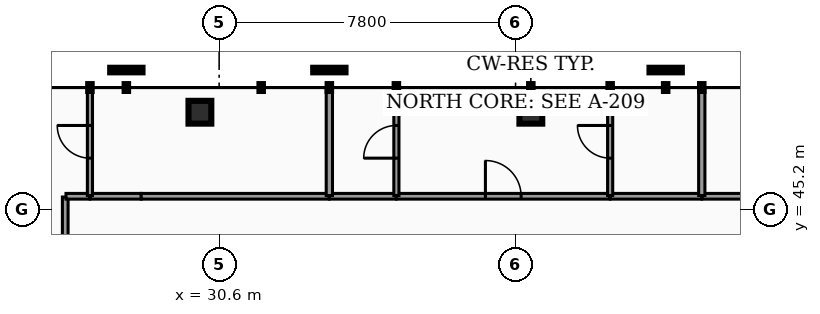
"""IFC4 building model, lengths in metres.
Left out: names, types, materials, properties, quantities, classifications, styles, units other than length and angle.
Written with IfcOpenShell. Run it as: python <this file> out.ifc"""

import sys

from ifc_helpers import new_model, si_unit, direction, frame, frame_2d, origin, origin_2d, place, context, subcontext, project, spatial, rectangle, hollow_rectangle, extrude, element, fill, save


model = new_model("IFC4")
c1 = context("Model", 3, precision=1e-05, world=origin(), true_north=direction((0.0, 1.0)))
c2 = subcontext(c1, "Body", "Model", "MODEL_VIEW")
j1 = project(units=[si_unit("LENGTHUNIT", "METRE"), si_unit("PLANEANGLEUNIT", "RADIAN")], contexts=[c1])
p1 = place(None, origin())
s1 = spatial("IfcSite", under=j1, at=p1, CompositionType="ELEMENT")
p2 = place(p1, origin())
s2 = spatial("IfcBuilding", under=s1, at=p2, CompositionType="ELEMENT")
p3 = place(p2, frame((0.0, 0.0, 212.16)))
s3 = spatial("IfcBuildingStorey", under=s2, at=p3, CompositionType="ELEMENT", Elevation=212.16)
for number, where, z_axis, x_axis in (
    (1, (38.802, 47.761, 0.0), (0.0, 0.0, 1.0), (1.0, 0.0, 0.0)),
    (2, (30.094, 47.761, 0.0), (0.0, 0.0, 1.0), (1.0, 0.0, 0.0)),
):
    element("IfcColumn", number, at=place(p3, frame(where, z_axis=z_axis, x_axis=x_axis)), inside=s3, PredefinedType="COLUMN", context=c2, shape_type="SweptSolid", body=[
        extrude(hollow_rectangle(XDim=0.6, YDim=0.6, WallThickness=0.03, at=origin_2d()), origin(), (0.0, 0.0, 1.0), 3.18),
    ])
p4 = place(p3, frame((26.55, 43.55, 0.0), z_axis=(0.0, 0.0, 1.0), x_axis=(0.0, 1.0, 0.0)))
e3 = element("IfcWall", 3, at=p4, inside=s3, PredefinedType="PARTITIONING", context=c2, shape_type="SweptSolid", body=[
    extrude(rectangle(XDim=1.98, YDim=0.15, at=frame_2d((0.99, 0.0))), origin(), (0.0, 0.0, 1.0), 2.235),
])
p5 = place(p3, frame((26.57, 45.55, 0.0), z_axis=(0.0, 0.0, 1.0), x_axis=(1.0, 0.0, 0.0)))
e4 = element("IfcWall", 4, at=p5, inside=s3, PredefinedType="PARTITIONING", context=c2, shape_type="SweptSolid", body=[
    extrude(rectangle(XDim=0.625, YDim=0.15, at=frame_2d((0.312, 0.0))), origin(), (0.0, 0.0, 1.0), 2.235),
])
p6 = place(p3, frame((27.205, 45.55, 0.0), z_axis=(0.0, 0.0, 1.0), x_axis=(1.0, 0.0, 0.0)))
e5 = element("IfcWall", 5, at=p6, inside=s3, PredefinedType="PARTITIONING", context=c2, shape_type="SweptSolid", body=[
    extrude(rectangle(XDim=1.345, YDim=0.15, at=frame_2d((0.672, 0.0))), origin(), (0.0, 0.0, 1.0), 2.235),
])
p7 = place(p3, frame((28.55, 45.55, 0.0), z_axis=(0.0, 0.0, 1.0), x_axis=(1.0, 0.0, 0.0)))
e6 = element("IfcWall", 6, at=p7, inside=s3, PredefinedType="PARTITIONING", context=c2, shape_type="SweptSolid", body=[
    extrude(rectangle(XDim=4.945, YDim=0.15, at=frame_2d((2.473, 0.0))), origin(), (0.0, 0.0, 1.0), 2.235),
])
p8 = place(p3, frame((43.305, 45.55, 0.0), z_axis=(0.0, 0.0, 1.0), x_axis=(1.0, 0.0, 0.0)))
e7 = element("IfcWall", 7, at=p8, inside=s3, PredefinedType="PARTITIONING", context=c2, shape_type="SweptSolid", body=[
    extrude(rectangle(XDim=1.97, YDim=0.15, at=frame_2d((0.985, 0.0))), origin(), (0.0, 0.0, 1.0), 2.235),
])
p9 = place(p3, frame((35.269, 45.55, 0.0), z_axis=(0.0, 0.0, 1.0), x_axis=(1.0, 0.0, 0.0)))
e8 = element("IfcWall", 8, at=p9, inside=s3, PredefinedType="PARTITIONING", context=c2, shape_type="SweptSolid", body=[
    extrude(rectangle(XDim=5.615, YDim=0.15, at=frame_2d((2.808, 0.0))), origin(), (0.0, 0.0, 1.0), 2.235),
])
p10 = place(p9, frame((2.338, 0.0, 0.0)))
e9 = element("IfcOpeningElement", 9, at=p10, cuts=e8, PredefinedType="OPENING", context=c2, shape_type="SweptSolid", body=[
    extrude(rectangle(XDim=0.94, YDim=2.05, at=frame_2d((0.47, 1.025))), frame((0.0, 0.085, 0.0), z_axis=(0.0, -1.0, 0.0), x_axis=(1.0, 0.0, 0.0)), (0.0, 0.0, 1.0), 0.17),
])
p11 = place(p3, frame((40.894, 45.55, 0.0), z_axis=(0.0, 0.0, 1.0), x_axis=(1.0, 0.0, 0.0)))
e10 = element("IfcWall", 10, at=p11, inside=s3, PredefinedType="PARTITIONING", context=c2, shape_type="SweptSolid", body=[
    extrude(rectangle(XDim=2.401, YDim=0.15, at=frame_2d((1.2, 0.0))), origin(), (0.0, 0.0, 1.0), 2.235),
])
p12 = place(p3, frame((33.505, 45.55, 0.0), z_axis=(0.0, 0.0, 1.0), x_axis=(1.0, 0.0, 0.0)))
e11 = element("IfcWall", 11, at=p12, inside=s3, PredefinedType="PARTITIONING", context=c2, shape_type="SweptSolid", body=[
    extrude(rectangle(XDim=1.754, YDim=0.15, at=frame_2d((0.877, 0.0))), origin(), (0.0, 0.0, 1.0), 2.235),
])
p13 = place(p3, frame((27.2, 45.57, 0.0), z_axis=(0.0, 0.0, 1.0), x_axis=(0.0, 1.0, 0.0)))
e12 = element("IfcWall", 12, at=p13, inside=s3, PredefinedType="PARTITIONING", context=c2, shape_type="SweptSolid", body=[
    extrude(rectangle(XDim=2.826, YDim=0.135, at=frame_2d((1.413, 0.0))), origin(), (0.0, 0.0, 1.0), 2.235),
])
p14 = place(p13, frame((0.983, 0.0, 0.0)))
e13 = element("IfcOpeningElement", 13, at=p14, cuts=e12, PredefinedType="OPENING", context=c2, shape_type="SweptSolid", body=[
    extrude(rectangle(XDim=0.86, YDim=2.05, at=frame_2d((0.43, 1.025))), frame((0.0, 0.077, 0.0), z_axis=(0.0, -1.0, 0.0), x_axis=(1.0, 0.0, 0.0)), (0.0, 0.0, 1.0), 0.155),
])
for number, where, z_axis, x_axis in (
    (14, (33.5, 45.57, 0.0), (0.0, 0.0, 1.0), (0.0, 1.0, 0.0)),
    (15, (43.3, 45.57, 0.0), (0.0, 0.0, 1.0), (0.0, 1.0, 0.0)),
):
    element("IfcWall", number, at=place(p3, frame(where, z_axis=z_axis, x_axis=x_axis)), inside=s3, PredefinedType="PARTITIONING", context=c2, shape_type="SweptSolid", body=[
        extrude(rectangle(XDim=2.826, YDim=0.165, at=frame_2d((1.413, 0.0))), origin(), (0.0, 0.0, 1.0), 2.235),
    ])
p15 = place(p3, frame((40.889, 45.57, 0.0), z_axis=(0.0, 0.0, 1.0), x_axis=(0.0, 1.0, 0.0)))
e16 = element("IfcWall", 16, at=p15, inside=s3, PredefinedType="PARTITIONING", context=c2, shape_type="SweptSolid", body=[
    extrude(rectangle(XDim=2.826, YDim=0.135, at=frame_2d((1.413, 0.0))), origin(), (0.0, 0.0, 1.0), 2.235),
])
p16 = place(p15, frame((0.983, 0.0, 0.0)))
e17 = element("IfcOpeningElement", 17, at=p16, cuts=e16, PredefinedType="OPENING", context=c2, shape_type="SweptSolid", body=[
    extrude(rectangle(XDim=0.86, YDim=2.05, at=frame_2d((0.43, 1.025))), frame((0.0, 0.077, 0.0), z_axis=(0.0, -1.0, 0.0), x_axis=(1.0, 0.0, 0.0)), (0.0, 0.0, 1.0), 0.155),
])
p17 = place(p3, frame((35.264, 45.57, 0.0), z_axis=(0.0, 0.0, 1.0), x_axis=(0.0, 1.0, 0.0)))
e18 = element("IfcWall", 18, at=p17, inside=s3, PredefinedType="PARTITIONING", context=c2, shape_type="SweptSolid", body=[
    extrude(rectangle(XDim=2.826, YDim=0.135, at=frame_2d((1.413, 0.0))), origin(), (0.0, 0.0, 1.0), 2.235),
])
p18 = place(p17, frame((0.983, 0.0, 0.0)))
e19 = element("IfcOpeningElement", 19, at=p18, cuts=e18, PredefinedType="OPENING", context=c2, shape_type="SweptSolid", body=[
    extrude(rectangle(XDim=0.86, YDim=2.05, at=frame_2d((0.43, 1.025))), frame((0.0, 0.077, 0.0), z_axis=(0.0, -1.0, 0.0), x_axis=(1.0, 0.0, 0.0)), (0.0, 0.0, 1.0), 0.155),
])
p19 = place(p10, origin())
e20 = element("IfcDoor", 20, at=p19, inside=s3, OperationType="SINGLE_SWING_LEFT", PredefinedType="DOOR", context=c2, shape_type="SweptSolid", body=[
    extrude(rectangle(XDim=0.94, YDim=2.05, at=frame_2d((0.47, 1.025))), frame((0.0, 0.025, 0.0), z_axis=(0.0, -1.0, 0.0), x_axis=(1.0, 0.0, 0.0)), (0.0, 0.0, 1.0), 0.05),
])
fill(e9, e20)
p20 = place(p14, origin())
e21 = element("IfcDoor", 21, at=p20, inside=s3, OperationType="SINGLE_SWING_RIGHT", PredefinedType="DOOR", context=c2, shape_type="SweptSolid", body=[
    extrude(rectangle(XDim=0.86, YDim=2.05, at=frame_2d((0.43, 1.025))), frame((0.0, 0.025, 0.0), z_axis=(0.0, -1.0, 0.0), x_axis=(1.0, 0.0, 0.0)), (0.0, 0.0, 1.0), 0.05),
])
fill(e13, e21)
p21 = place(p16, origin())
e22 = element("IfcDoor", 22, at=p21, inside=s3, OperationType="SINGLE_SWING_RIGHT", PredefinedType="DOOR", context=c2, shape_type="SweptSolid", body=[
    extrude(rectangle(XDim=0.86, YDim=2.05, at=frame_2d((0.43, 1.025))), frame((0.0, 0.025, 0.0), z_axis=(0.0, -1.0, 0.0), x_axis=(1.0, 0.0, 0.0)), (0.0, 0.0, 1.0), 0.05),
])
fill(e17, e22)
p22 = place(p18, origin())
e23 = element("IfcDoor", 23, at=p22, inside=s3, OperationType="SINGLE_SWING_LEFT", PredefinedType="DOOR", context=c2, shape_type="SweptSolid", body=[
    extrude(rectangle(XDim=0.86, YDim=2.05, at=frame_2d((0.43, 1.025))), frame((0.0, 0.025, 0.0), z_axis=(0.0, -1.0, 0.0), x_axis=(1.0, 0.0, 0.0)), (0.0, 0.0, 1.0), 0.05),
])
fill(e19, e23)
save(model, sys.argv[1])
